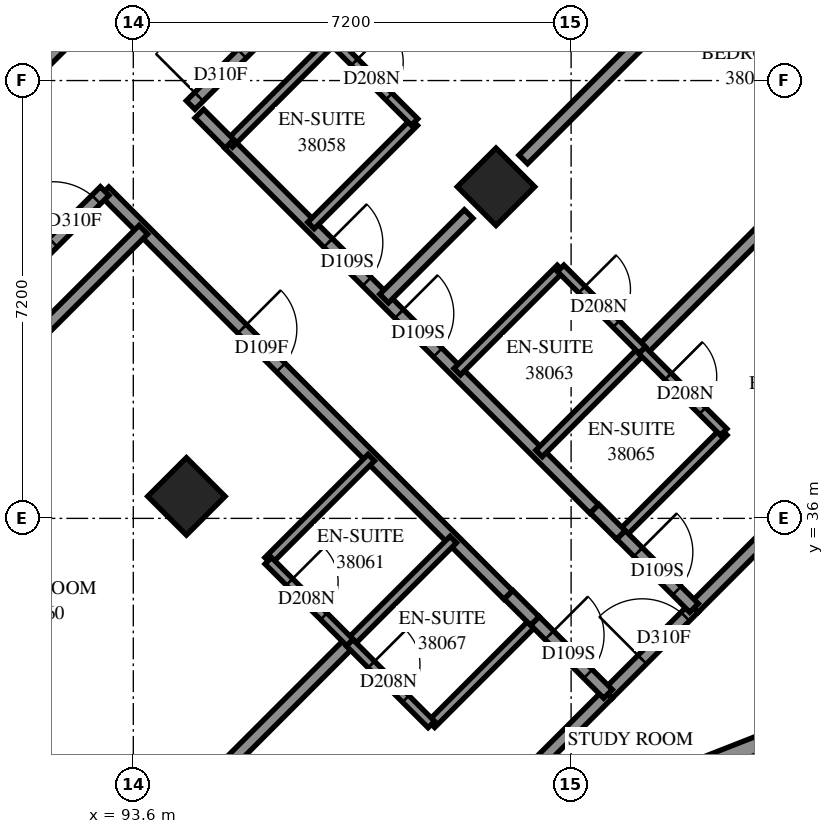
"""IFC4 building model, lengths in metres.
Left out: names, types, materials, properties, quantities, classifications, styles, units other than length and angle.
Written with IfcOpenShell. Run it as: python <this file> out.ifc"""

import sys

from ifc_helpers import new_model, si_unit, direction, frame, frame_2d, origin, origin_2d, place, context, subcontext, project, spatial, polyline, rectangle, outline, extrude, element, fill, save


model = new_model("IFC4")
c1 = context("Model", 3, precision=1e-05, world=origin(), true_north=direction((0.0, 1.0)))
c2 = subcontext(c1, "Body", "Model", "MODEL_VIEW")
j1 = project(units=[si_unit("LENGTHUNIT", "METRE"), si_unit("PLANEANGLEUNIT", "RADIAN")], contexts=[c1])
p1 = place(None, origin())
s1 = spatial("IfcSite", under=j1, at=p1, CompositionType="ELEMENT")
p2 = place(p1, origin())
s2 = spatial("IfcBuilding", under=s1, at=p2, CompositionType="ELEMENT")
p3 = place(p2, frame((0.0, 0.0, 142.2)))
s3 = spatial("IfcBuildingStorey", under=s2, at=p3, CompositionType="ELEMENT", Elevation=142.2)
for number, where, z_axis, x_axis in (
    (1, (99.565, 41.453, 0.0), (0.0, 0.0, 1.0), (0.707, -0.707, 0.0)),
    (2, (94.474, 36.362, 0.0), (0.0, 0.0, 1.0), (0.707, -0.707, 0.0)),
):
    element("IfcColumn", number, at=place(p3, frame(where, z_axis=z_axis, x_axis=x_axis)), inside=s3, PredefinedType="COLUMN", context=c2, shape_type="SweptSolid", body=[
        extrude(rectangle(XDim=0.9, YDim=0.9, at=origin_2d()), origin(), (0.0, 0.0, 1.0), 3.1),
    ])
p4 = place(p3, frame((87.049, 38.695, -0.3), z_axis=(0.0, 0.0, 1.0), x_axis=(0.7071067812, 0.7071067812, 0.0)))
e3 = element("IfcWall", 3, at=p4, inside=s3, PredefinedType="SHEAR", context=c2, shape_type="SweptSolid", body=[
    extrude(rectangle(XDim=14.4, YDim=0.6, at=frame_2d((7.2, 0.0))), origin(), (0.0, 0.0, 1.0), 2.7),
])
p5 = place(p4, frame((4.55, 0.0, 0.3)))
e4 = element("IfcOpeningElement", 4, at=p5, cuts=e3, PredefinedType="OPENING", context=c2, shape_type="SweptSolid", body=[
    extrude(rectangle(XDim=1.1, YDim=2.1, at=frame_2d((0.55, 1.05))), frame((0.0, 0.31, 0.0), z_axis=(0.0, -1.0, 0.0), x_axis=(1.0, 0.0, 0.0)), (0.0, 0.0, 1.0), 0.62),
])
p6 = place(p4, frame((11.35, 0.0, 0.3)))
e5 = element("IfcOpeningElement", 5, at=p6, cuts=e3, PredefinedType="OPENING", context=c2, shape_type="SweptSolid", body=[
    extrude(rectangle(XDim=1.1, YDim=2.1, at=frame_2d((0.55, 1.05))), frame((0.0, 0.31, 0.0), z_axis=(0.0, -1.0, 0.0), x_axis=(1.0, 0.0, 0.0)), (0.0, 0.0, 1.0), 0.62),
])
p7 = place(p3, frame((100.871, 30.982, 0.0), z_axis=(0.0, 0.0, 1.0), x_axis=(0.9309312258, 0.3651945412, 0.0)))
e6 = element("IfcWall", 6, at=p7, inside=s3, PredefinedType="SOLIDWALL", context=c2, shape_type="SweptSolid", body=[
    extrude(outline(polyline([(0.109, -0.25), (5.609, -0.25), (5.38, 0.25), (-0.109, 0.25), (0.109, -0.25)])), origin(), (0.0, 0.0, 1.0), 3.1),
])
p8 = place(p7, frame((0.596, 0.0, 0.45)))
e7 = element("IfcOpeningElement", 7, at=p8, cuts=e6, PredefinedType="OPENING", context=c2, shape_type="SweptSolid", body=[
    extrude(rectangle(XDim=2.8, YDim=2.5, at=frame_2d((1.4, 1.25))), frame((0.0, 0.26, 0.0), z_axis=(0.0, -1.0, 0.0), x_axis=(1.0, 0.0, 0.0)), (0.0, 0.0, 1.0), 0.52),
])
p9 = place(p3, frame((93.127, 41.379, 0.0), z_axis=(0.0, 0.0, 1.0), x_axis=(0.7071067812, -0.7071067812, 0.0)))
e8 = element("IfcWall", 8, at=p9, inside=s3, PredefinedType="PARTITIONING", context=c2, shape_type="SweptSolid", body=[
    extrude(rectangle(XDim=9.39, YDim=0.2, at=frame_2d((4.695, 0.0))), origin(), (0.0, 0.0, 1.0), 3.1),
])
p10 = place(p9, frame((3.2, 0.0, 0.0)))
e9 = element("IfcOpeningElement", 9, at=p10, cuts=e8, PredefinedType="OPENING", context=c2, shape_type="SweptSolid", body=[
    extrude(rectangle(XDim=0.9, YDim=2.1, at=frame_2d((0.45, 1.05))), frame((0.0, 0.11, 0.0), z_axis=(0.0, -1.0, 0.0), x_axis=(1.0, 0.0, 0.0)), (0.0, 0.0, 1.0), 0.22),
])
p11 = place(p3, frame((94.543, 42.797, 0.0), z_axis=(0.0, 0.0, 1.0), x_axis=(0.7071067812, 0.7071067812, 0.0)))
e10 = element("IfcWall", 10, at=p11, inside=s3, PredefinedType="PARTITIONING", context=c2, shape_type="SweptSolid", body=[
    extrude(rectangle(XDim=8.901, YDim=0.2, at=frame_2d((4.45, 0.0))), origin(), (0.0, 0.0, 1.0), 3.1),
])
p12 = place(p11, frame((0.193, 0.0, 0.0)))
e11 = element("IfcOpeningElement", 11, at=p12, cuts=e10, PredefinedType="OPENING", context=c2, shape_type="SweptSolid", body=[
    extrude(rectangle(XDim=1.0, YDim=2.1, at=frame_2d((0.5, 1.05))), frame((0.0, 0.11, 0.0), z_axis=(0.0, -1.0, 0.0), x_axis=(1.0, 0.0, 0.0)), (0.0, 0.0, 1.0), 0.22),
])
p13 = place(p3, frame((86.837, 35.091, 0.0), z_axis=(0.0, 0.0, 1.0), x_axis=(0.7071067812, 0.7071067812, 0.0)))
e12 = element("IfcWall", 12, at=p13, inside=s3, PredefinedType="PARTITIONING", context=c2, shape_type="SweptSolid", body=[
    extrude(rectangle(XDim=8.898, YDim=0.2, at=frame_2d((4.449, 0.0))), origin(), (0.0, 0.0, 1.0), 3.1),
])
p14 = place(p13, frame((7.7, 0.0, 0.0)))
e13 = element("IfcOpeningElement", 13, at=p14, cuts=e12, PredefinedType="OPENING", context=c2, shape_type="SweptSolid", body=[
    extrude(rectangle(XDim=1.0, YDim=2.1, at=frame_2d((0.5, 1.05))), frame((0.0, 0.11, 0.0), z_axis=(0.0, -1.0, 0.0), x_axis=(1.0, 0.0, 0.0)), (0.0, 0.0, 1.0), 0.22),
])
p15 = place(p3, frame((95.177, 42.157, 0.0), z_axis=(0.0, 0.0, 1.0), x_axis=(0.7071067812, -0.7071067812, 0.0)))
e14 = element("IfcWall", 14, at=p15, inside=s3, PredefinedType="PARTITIONING", context=c2, shape_type="SweptSolid", body=[
    extrude(rectangle(XDim=8.491, YDim=0.2, at=frame_2d((4.245, 0.0))), origin(), (0.0, 0.0, 1.0), 3.1),
])
p16 = place(p15, frame((2.3, 0.0, 0.0)))
e15 = element("IfcOpeningElement", 15, at=p16, cuts=e14, PredefinedType="OPENING", context=c2, shape_type="SweptSolid", body=[
    extrude(rectangle(XDim=0.9, YDim=2.1, at=frame_2d((0.45, 1.05))), frame((0.0, 0.11, 0.0), z_axis=(0.0, -1.0, 0.0), x_axis=(1.0, 0.0, 0.0)), (0.0, 0.0, 1.0), 0.22),
])
p17 = place(p15, frame((3.95, 0.0, 0.0)))
e16 = element("IfcOpeningElement", 16, at=p17, cuts=e14, PredefinedType="OPENING", context=c2, shape_type="SweptSolid", body=[
    extrude(rectangle(XDim=0.9, YDim=2.1, at=frame_2d((0.45, 1.05))), frame((0.0, 0.11, 0.0), z_axis=(0.0, -1.0, 0.0), x_axis=(1.0, 0.0, 0.0)), (0.0, 0.0, 1.0), 0.22),
])
p18 = place(p3, frame((91.387, 28.186, 0.0), z_axis=(0.0, 0.0, 1.0), x_axis=(0.7071067812, 0.7071067812, 0.0)))
e17 = element("IfcWall", 17, at=p18, inside=s3, PredefinedType="PARTITIONING", context=c2, shape_type="SweptSolid", body=[
    extrude(rectangle(XDim=8.164, YDim=0.2, at=frame_2d((4.082, 0.0))), origin(), (0.0, 0.0, 1.0), 3.1),
])
p19 = place(p3, frame((100.013, 41.903, 0.0), z_axis=(0.0, 0.0, 1.0), x_axis=(0.7071067812, 0.7071067812, 0.0)))
e18 = element("IfcWall", 18, at=p19, inside=s3, PredefinedType="PARTITIONING", context=c2, shape_type="SweptSolid", body=[
    extrude(rectangle(XDim=5.928, YDim=0.2, at=frame_2d((2.964, 0.0))), origin(), (0.0, 0.0, 1.0), 3.1),
])
p20 = place(p3, frame((90.047, 37.029, 0.0), z_axis=(0.0, 0.0, 1.0), x_axis=(0.7071067812, 0.7071067812, 0.0)))
e19 = element("IfcWall", 19, at=p20, inside=s3, PredefinedType="PARTITIONING", context=c2, shape_type="SweptSolid", body=[
    extrude(rectangle(XDim=5.258, YDim=0.2, at=frame_2d((2.629, 0.0))), origin(), (0.0, 0.0, 1.0), 3.1),
])
p21 = place(p3, frame((101.968, 38.766, 0.0), z_axis=(0.0, 0.0, 1.0), x_axis=(0.7071067812, 0.7071067812, 0.0)))
e20 = element("IfcWall", 20, at=p21, inside=s3, PredefinedType="PARTITIONING", context=c2, shape_type="SweptSolid", body=[
    extrude(rectangle(XDim=3.3, YDim=0.2, at=frame_2d((1.65, 0.0))), origin(), (0.0, 0.0, 1.0), 3.1),
])
for number, where, z_axis, x_axis in (
    (21, (96.523, 40.817, 0.0), (0.0, 0.0, 1.0), (0.707, 0.707, 0.0)),
    (22, (98.927, 38.413, 0.0), (0.0, 0.0, 1.0), (0.707, 0.707, 0.0)),
    (23, (98.503, 32.615, 0.0), (0.0, 0.0, 1.0), (0.707, 0.707, 0.0)),
    (24, (95.179, 42.161, 0.0), (0.0, 0.0, 1.0), (0.707, 0.707, 0.0)),
):
    element("IfcWall", number, at=place(p3, frame(where, z_axis=z_axis, x_axis=x_axis)), inside=s3, PredefinedType="PARTITIONING", context=c2, shape_type="SweptSolid", body=[
        extrude(rectangle(XDim=2.401, YDim=0.15, at=frame_2d((1.201, 0.0))), origin(), (0.0, 0.0, 1.0), 3.1),
    ])
for number, where, z_axis, x_axis in (
    (25, (97.163, 33.955, 0.0), (0.0, 0.0, 1.0), (0.708, 0.707, 0.0)),
    (26, (100.273, 37.067, 0.0), (0.0, 0.0, 1.0), (0.707, 0.708, 0.0)),
):
    element("IfcWall", number, at=place(p3, frame(where, z_axis=z_axis, x_axis=x_axis)), inside=s3, PredefinedType="PARTITIONING", context=c2, shape_type="SweptSolid", body=[
        extrude(rectangle(XDim=2.4, YDim=0.15, at=frame_2d((1.2, 0.0))), origin(), (0.0, 0.0, 1.0), 3.1),
    ])
for number, where, z_axis, x_axis in (
    (27, (95.817, 35.303, 0.0), (0.0, 0.0, 1.0), (0.707, 0.707, 0.0)),
    (28, (101.615, 35.727, 0.0), (0.0, 0.0, 1.0), (0.707, 0.707, 0.0)),
):
    element("IfcWall", number, at=place(p3, frame(where, z_axis=z_axis, x_axis=x_axis)), inside=s3, PredefinedType="PARTITIONING", context=c2, shape_type="SweptSolid", body=[
        extrude(rectangle(XDim=2.398, YDim=0.15, at=frame_2d((1.199, 0.0))), origin(), (0.0, 0.0, 1.0), 3.1),
    ])
p22 = place(p3, frame((101.403, 33.111, 0.0), z_axis=(0.0, 0.0, 1.0), x_axis=(0.7071067812, 0.7071067812, 0.0)))
e29 = element("IfcWall", 29, at=p22, inside=s3, PredefinedType="PARTITIONING", context=c2, shape_type="SweptSolid", body=[
    extrude(rectangle(XDim=2.0, YDim=0.2, at=frame_2d((1.0, 0.0))), origin(), (0.0, 0.0, 1.0), 2.6),
])
p23 = place(p22, frame((0.802, 0.0, 0.0)))
e30 = element("IfcOpeningElement", 30, at=p23, cuts=e29, PredefinedType="OPENING", context=c2, shape_type="SweptSolid", body=[
    extrude(rectangle(XDim=1.0, YDim=2.1, at=frame_2d((0.5, 1.05))), frame((0.0, 0.11, 0.0), z_axis=(0.0, -1.0, 0.0), x_axis=(1.0, 0.0, 0.0)), (0.0, 0.0, 1.0), 0.22),
])
p24 = place(p3, frame((100.013, 31.721, 0.0), z_axis=(0.0, 0.0, 1.0), x_axis=(0.7071067812, 0.7071067812, 0.0)))
e31 = element("IfcWall", 31, at=p24, inside=s3, PredefinedType="PARTITIONING", context=c2, shape_type="SweptSolid", body=[
    extrude(rectangle(XDim=1.966, YDim=0.2, at=frame_2d((0.983, 0.0))), origin(), (0.0, 0.0, 1.0), 2.6),
])
p25 = place(p3, frame((97.725, 39.615, 0.0), z_axis=(0.0, 0.0, 1.0), x_axis=(0.7071067812, 0.7071067812, 0.0)))
e32 = element("IfcWall", 32, at=p25, inside=s3, PredefinedType="PARTITIONING", context=c2, shape_type="SweptSolid", body=[
    extrude(rectangle(XDim=1.966, YDim=0.2, at=frame_2d((0.983, 0.0))), origin(), (0.0, 0.0, 1.0), 3.1),
])
p26 = place(p3, frame((102.817, 34.525, 0.0), z_axis=(0.0, 0.0, 1.0), x_axis=(0.7071067812, 0.7071067812, 0.0)))
e33 = element("IfcWall", 33, at=p26, inside=s3, PredefinedType="PARTITIONING", context=c2, shape_type="SweptSolid", body=[
    extrude(rectangle(XDim=1.963, YDim=0.2, at=frame_2d((0.982, 0.0))), origin(), (0.0, 0.0, 1.0), 2.6),
])
p27 = place(p3, frame((97.157, 33.955, 0.0), z_axis=(0.0, 0.0, 1.0), x_axis=(0.7071067812, -0.7071067812, 0.0)))
e34 = element("IfcWall", 34, at=p27, inside=s3, PredefinedType="PARTITIONING", context=c2, shape_type="SweptSolid", body=[
    extrude(rectangle(XDim=1.901, YDim=0.15, at=frame_2d((0.95, 0.0))), origin(), (0.0, 0.0, 1.0), 3.1),
])
p28 = place(p27, frame((0.506, 0.0, 0.0)))
e35 = element("IfcOpeningElement", 35, at=p28, cuts=e34, PredefinedType="OPENING", context=c2, shape_type="SweptSolid", body=[
    extrude(rectangle(XDim=0.8, YDim=2.1, at=frame_2d((0.4, 1.05))), frame((0.0, 0.085, 0.0), z_axis=(0.0, -1.0, 0.0), x_axis=(1.0, 0.0, 0.0)), (0.0, 0.0, 1.0), 0.17),
])
p29 = place(p3, frame((96.881, 43.861, 0.0), z_axis=(0.0, 0.0, 1.0), x_axis=(0.7071067812, -0.7071067812, 0.0)))
e36 = element("IfcWall", 36, at=p29, inside=s3, PredefinedType="PARTITIONING", context=c2, shape_type="SweptSolid", body=[
    extrude(rectangle(XDim=1.901, YDim=0.15, at=frame_2d((0.95, 0.0))), origin(), (0.0, 0.0, 1.0), 3.1),
])
p30 = place(p29, frame((0.505, 0.0, 0.0)))
e37 = element("IfcOpeningElement", 37, at=p30, cuts=e36, PredefinedType="OPENING", context=c2, shape_type="SweptSolid", body=[
    extrude(rectangle(XDim=0.8, YDim=2.1, at=frame_2d((0.4, 1.05))), frame((0.0, 0.085, 0.0), z_axis=(0.0, -1.0, 0.0), x_axis=(1.0, 0.0, 0.0)), (0.0, 0.0, 1.0), 0.17),
])
p31 = place(p3, frame((101.965, 38.763, 0.0), z_axis=(0.0, 0.0, 1.0), x_axis=(0.7071067812, -0.7071067812, 0.0)))
e38 = element("IfcWall", 38, at=p31, inside=s3, PredefinedType="PARTITIONING", context=c2, shape_type="SweptSolid", body=[
    extrude(rectangle(XDim=1.901, YDim=0.15, at=frame_2d((0.95, 0.0))), origin(), (0.0, 0.0, 1.0), 3.1),
])
p32 = place(p31, frame((0.608, 0.0, 0.0)))
e39 = element("IfcOpeningElement", 39, at=p32, cuts=e38, PredefinedType="OPENING", context=c2, shape_type="SweptSolid", body=[
    extrude(rectangle(XDim=0.8, YDim=2.1, at=frame_2d((0.4, 1.05))), frame((0.0, 0.085, 0.0), z_axis=(0.0, -1.0, 0.0), x_axis=(1.0, 0.0, 0.0)), (0.0, 0.0, 1.0), 0.17),
])
p33 = place(p3, frame((100.628, 40.112, 0.0), z_axis=(0.0, 0.0, 1.0), x_axis=(0.7065800724, -0.7076330979, 0.0)))
e40 = element("IfcWall", 40, at=p33, inside=s3, PredefinedType="PARTITIONING", context=c2, shape_type="SweptSolid", body=[
    extrude(rectangle(XDim=1.899, YDim=0.15, at=frame_2d((0.95, 0.0))), origin(), (0.0, 0.0, 1.0), 3.1),
])
p34 = place(p33, frame((0.493, 0.0, 0.0)))
e41 = element("IfcOpeningElement", 41, at=p34, cuts=e40, PredefinedType="OPENING", context=c2, shape_type="SweptSolid", body=[
    extrude(rectangle(XDim=0.8, YDim=2.1, at=frame_2d((0.4, 1.05))), frame((0.0, 0.085, 0.0), z_axis=(0.0, -1.0, 0.0), x_axis=(1.0, 0.0, 0.0)), (0.0, 0.0, 1.0), 0.17),
])
p35 = place(p3, frame((95.82, 35.304, 0.0), z_axis=(0.0, 0.0, 1.0), x_axis=(0.7065800724, -0.7076330979, 0.0)))
e42 = element("IfcWall", 42, at=p35, inside=s3, PredefinedType="PARTITIONING", context=c2, shape_type="SweptSolid", body=[
    extrude(rectangle(XDim=1.899, YDim=0.15, at=frame_2d((0.95, 0.0))), origin(), (0.0, 0.0, 1.0), 3.1),
])
p36 = place(p35, frame((0.493, 0.0, 0.0)))
e43 = element("IfcOpeningElement", 43, at=p36, cuts=e42, PredefinedType="OPENING", context=c2, shape_type="SweptSolid", body=[
    extrude(rectangle(XDim=0.8, YDim=2.1, at=frame_2d((0.4, 1.05))), frame((0.0, 0.085, 0.0), z_axis=(0.0, -1.0, 0.0), x_axis=(1.0, 0.0, 0.0)), (0.0, 0.0, 1.0), 0.17),
])
p37 = place(p3, frame((100.205, 34.315, 0.0), z_axis=(0.0, 0.0, 1.0), x_axis=(0.7071067812, -0.7071067812, 0.0)))
e44 = element("IfcWall", 44, at=p37, inside=s3, PredefinedType="PARTITIONING", context=c2, shape_type="SweptSolid", body=[
    extrude(rectangle(XDim=1.7, YDim=0.2, at=frame_2d((0.85, 0.0))), origin(), (0.0, 0.0, 1.0), 3.1),
])
p38 = place(p37, frame((0.335, 0.0, 0.0)))
e45 = element("IfcOpeningElement", 45, at=p38, cuts=e44, PredefinedType="OPENING", context=c2, shape_type="SweptSolid", body=[
    extrude(rectangle(XDim=0.9, YDim=2.1, at=frame_2d((0.45, 1.05))), frame((0.0, 0.11, 0.0), z_axis=(0.0, -1.0, 0.0), x_axis=(1.0, 0.0, 0.0)), (0.0, 0.0, 1.0), 0.22),
])
p39 = place(p3, frame((101.619, 35.729, 0.0), z_axis=(0.0, 0.0, 1.0), x_axis=(0.7071067812, -0.7071067812, 0.0)))
e46 = element("IfcWall", 46, at=p39, inside=s3, PredefinedType="PARTITIONING", context=c2, shape_type="SweptSolid", body=[
    extrude(rectangle(XDim=1.7, YDim=0.2, at=frame_2d((0.85, 0.0))), origin(), (0.0, 0.0, 1.0), 3.1),
])
p40 = place(p39, frame((0.4, 0.0, 0.0)))
e47 = element("IfcOpeningElement", 47, at=p40, cuts=e46, PredefinedType="OPENING", context=c2, shape_type="SweptSolid", body=[
    extrude(rectangle(XDim=0.9, YDim=2.1, at=frame_2d((0.45, 1.05))), frame((0.0, 0.11, 0.0), z_axis=(0.0, -1.0, 0.0), x_axis=(1.0, 0.0, 0.0)), (0.0, 0.0, 1.0), 0.22),
])
p41 = place(p3, frame((94.686, 42.656, 0.0), z_axis=(0.0, 0.0, 1.0), x_axis=(0.7056768426, -0.7085338339, 0.0)))
e48 = element("IfcWall", 48, at=p41, inside=s3, PredefinedType="PARTITIONING", context=c2, shape_type="SweptSolid", body=[
    extrude(rectangle(XDim=0.7, YDim=0.2, at=frame_2d((0.35, 0.0))), origin(), (0.0, 0.0, 1.0), 3.1),
])
for number, where, z_axis, x_axis in (
    (49, (101.186, 36.158, 0.0), (0.0, 0.0, 1.0), (0.709, -0.705, 0.0)),
    (50, (99.772, 34.744, 0.0), (0.0, 0.0, 1.0), (0.709, -0.705, 0.0)),
):
    element("IfcWall", number, at=place(p3, frame(where, z_axis=z_axis, x_axis=x_axis)), inside=s3, PredefinedType="PARTITIONING", context=c2, shape_type="SweptSolid", body=[
        extrude(rectangle(XDim=0.61, YDim=0.2, at=frame_2d((0.305, 0.0))), origin(), (0.0, 0.0, 1.0), 3.1),
    ])
p42 = place(p8, origin())
e51 = element("IfcWindow", 51, at=p42, inside=s3, PartitioningType="SINGLE_PANEL", PredefinedType="WINDOW", context=c2, shape_type="SweptSolid", body=[
    extrude(rectangle(XDim=2.8, YDim=2.5, at=frame_2d((1.4, 1.25))), frame((0.0, 0.18, 0.0), z_axis=(0.0, -1.0, 0.0), x_axis=(1.0, 0.0, 0.0)), (0.0, 0.0, 1.0), 0.06),
])
fill(e7, e51)
p43 = place(p12, origin())
e52 = element("IfcDoor", 52, at=p43, inside=s3, OperationType="SINGLE_SWING_LEFT", PredefinedType="DOOR", context=c2, shape_type="SweptSolid", body=[
    extrude(rectangle(XDim=1.0, YDim=2.1, at=frame_2d((0.5, 1.05))), frame((0.0, 0.025, 0.0), z_axis=(0.0, -1.0, 0.0), x_axis=(1.0, 0.0, 0.0)), (0.0, 0.0, 1.0), 0.05),
])
fill(e11, e52)
p44 = place(p16, origin())
e53 = element("IfcDoor", 53, at=p44, inside=s3, OperationType="SINGLE_SWING_RIGHT", PredefinedType="DOOR", context=c2, shape_type="SweptSolid", body=[
    extrude(rectangle(XDim=0.9, YDim=2.1, at=frame_2d((0.45, 1.05))), frame((0.0, 0.025, 0.0), z_axis=(0.0, -1.0, 0.0), x_axis=(1.0, 0.0, 0.0)), (0.0, 0.0, 1.0), 0.05),
])
fill(e15, e53)
p45 = place(p30, origin())
e54 = element("IfcDoor", 54, at=p45, inside=s3, OperationType="SINGLE_SWING_RIGHT", PredefinedType="DOOR", context=c2, shape_type="SweptSolid", body=[
    extrude(rectangle(XDim=0.8, YDim=2.1, at=frame_2d((0.4, 1.05))), frame((0.0, 0.025, 0.0), z_axis=(0.0, -1.0, 0.0), x_axis=(1.0, 0.0, 0.0)), (0.0, 0.0, 1.0), 0.05),
])
fill(e37, e54)
p46 = place(p14, origin())
e55 = element("IfcDoor", 55, at=p46, inside=s3, OperationType="SINGLE_SWING_LEFT", PredefinedType="DOOR", context=c2, shape_type="SweptSolid", body=[
    extrude(rectangle(XDim=1.0, YDim=2.1, at=frame_2d((0.5, 1.05))), frame((0.0, 0.025, 0.0), z_axis=(0.0, -1.0, 0.0), x_axis=(1.0, 0.0, 0.0)), (0.0, 0.0, 1.0), 0.05),
])
fill(e13, e55)
p47 = place(p10, origin())
e56 = element("IfcDoor", 56, at=p47, inside=s3, OperationType="SINGLE_SWING_LEFT", PredefinedType="DOOR", context=c2, shape_type="SweptSolid", body=[
    extrude(rectangle(XDim=0.9, YDim=2.1, at=frame_2d((0.45, 1.05))), frame((0.0, 0.025, 0.0), z_axis=(0.0, -1.0, 0.0), x_axis=(1.0, 0.0, 0.0)), (0.0, 0.0, 1.0), 0.05),
])
fill(e9, e56)
p48 = place(p36, origin())
e57 = element("IfcDoor", 57, at=p48, inside=s3, OperationType="SINGLE_SWING_RIGHT", PredefinedType="DOOR", context=c2, shape_type="SweptSolid", body=[
    extrude(rectangle(XDim=0.8, YDim=2.1, at=frame_2d((0.4, 1.05))), frame((0.0, 0.025, 0.0), z_axis=(0.0, -1.0, 0.0), x_axis=(1.0, 0.0, 0.0)), (0.0, 0.0, 1.0), 0.05),
])
fill(e43, e57)
p49 = place(p17, origin())
e58 = element("IfcDoor", 58, at=p49, inside=s3, OperationType="SINGLE_SWING_LEFT", PredefinedType="DOOR", context=c2, shape_type="SweptSolid", body=[
    extrude(rectangle(XDim=0.9, YDim=2.1, at=frame_2d((0.45, 1.05))), frame((0.0, 0.025, 0.0), z_axis=(0.0, -1.0, 0.0), x_axis=(1.0, 0.0, 0.0)), (0.0, 0.0, 1.0), 0.05),
])
fill(e16, e58)
p50 = place(p34, origin())
e59 = element("IfcDoor", 59, at=p50, inside=s3, OperationType="SINGLE_SWING_RIGHT", PredefinedType="DOOR", context=c2, shape_type="SweptSolid", body=[
    extrude(rectangle(XDim=0.8, YDim=2.1, at=frame_2d((0.4, 1.05))), frame((0.0, 0.025, 0.0), z_axis=(0.0, -1.0, 0.0), x_axis=(1.0, 0.0, 0.0)), (0.0, 0.0, 1.0), 0.05),
])
fill(e41, e59)
p51 = place(p40, origin())
e60 = element("IfcDoor", 60, at=p51, inside=s3, OperationType="SINGLE_SWING_RIGHT", PredefinedType="DOOR", context=c2, shape_type="SweptSolid", body=[
    extrude(rectangle(XDim=0.9, YDim=2.1, at=frame_2d((0.45, 1.05))), frame((0.0, 0.025, 0.0), z_axis=(0.0, -1.0, 0.0), x_axis=(1.0, 0.0, 0.0)), (0.0, 0.0, 1.0), 0.05),
])
fill(e47, e60)
p52 = place(p32, origin())
e61 = element("IfcDoor", 61, at=p52, inside=s3, OperationType="SINGLE_SWING_RIGHT", PredefinedType="DOOR", context=c2, shape_type="SweptSolid", body=[
    extrude(rectangle(XDim=0.8, YDim=2.1, at=frame_2d((0.4, 1.05))), frame((0.0, 0.025, 0.0), z_axis=(0.0, -1.0, 0.0), x_axis=(1.0, 0.0, 0.0)), (0.0, 0.0, 1.0), 0.05),
])
fill(e39, e61)
p53 = place(p38, origin())
e62 = element("IfcDoor", 62, at=p53, inside=s3, OperationType="SINGLE_SWING_LEFT", PredefinedType="DOOR", context=c2, shape_type="SweptSolid", body=[
    extrude(rectangle(XDim=0.9, YDim=2.1, at=frame_2d((0.45, 1.05))), frame((0.0, 0.025, 0.0), z_axis=(0.0, -1.0, 0.0), x_axis=(1.0, 0.0, 0.0)), (0.0, 0.0, 1.0), 0.05),
])
fill(e45, e62)
p54 = place(p28, origin())
e63 = element("IfcDoor", 63, at=p54, inside=s3, OperationType="SINGLE_SWING_RIGHT", PredefinedType="DOOR", context=c2, shape_type="SweptSolid", body=[
    extrude(rectangle(XDim=0.8, YDim=2.1, at=frame_2d((0.4, 1.05))), frame((0.0, 0.025, 0.0), z_axis=(0.0, -1.0, 0.0), x_axis=(1.0, 0.0, 0.0)), (0.0, 0.0, 1.0), 0.05),
])
fill(e35, e63)
p55 = place(p23, origin())
e64 = element("IfcDoor", 64, at=p55, inside=s3, OperationType="SINGLE_SWING_RIGHT", PredefinedType="DOOR", context=c2, shape_type="SweptSolid", body=[
    extrude(rectangle(XDim=1.0, YDim=2.1, at=frame_2d((0.5, 1.05))), frame((0.0, 0.025, 0.0), z_axis=(0.0, -1.0, 0.0), x_axis=(1.0, 0.0, 0.0)), (0.0, 0.0, 1.0), 0.05),
])
fill(e30, e64)
save(model, sys.argv[1])
